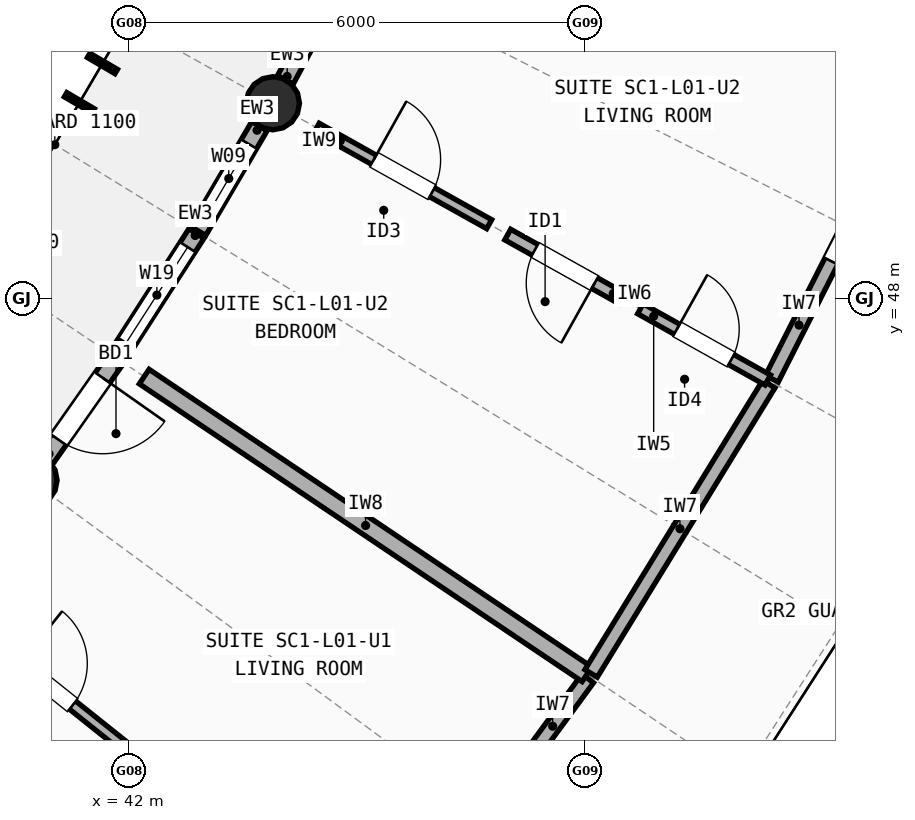
"""IFC4 building model, lengths in metres.
Left out: names, types, materials, properties, quantities, classifications, styles, units other than length and angle.
Written with IfcOpenShell. Run it as: python <this file> out.ifc"""

import sys

from ifc_helpers import new_model, si_unit, direction, frame, frame_2d, origin, origin_2d, place, context, subcontext, project, spatial, rectangle, circle, extrude, element, fill, save


model = new_model("IFC4")
c1 = context("Model", 3, precision=1e-05, world=origin(), true_north=direction((0.0, 1.0)))
c2 = subcontext(c1, "Body", "Model", "MODEL_VIEW")
j1 = project(units=[si_unit("LENGTHUNIT", "METRE"), si_unit("PLANEANGLEUNIT", "RADIAN")], contexts=[c1])
p1 = place(None, origin())
s1 = spatial("IfcSite", under=j1, at=p1, CompositionType="ELEMENT")
p2 = place(p1, origin())
s2 = spatial("IfcBuilding", under=s1, at=p2, CompositionType="ELEMENT")
p3 = place(p2, frame((0.0, 0.0, 4.5)))
s3 = spatial("IfcBuildingStorey", under=s2, at=p3, CompositionType="ELEMENT", Elevation=4.5)
for number, where, z_axis, x_axis in (
    (1, (40.704, 45.61, 0.0), (0.0, 0.0, 1.0), (1.0, 0.0, 0.0)),
    (2, (43.893, 50.57, 0.0), (0.0, 0.0, 1.0), (1.0, 0.0, 0.0)),
):
    element("IfcColumn", number, at=place(p3, frame(where, z_axis=z_axis, x_axis=x_axis)), inside=s3, PredefinedType="COLUMN", context=c2, shape_type="SweptSolid", body=[
        extrude(circle(Radius=0.35, at=origin_2d()), origin(), (0.0, 0.0, 1.0), 2.948),
    ])
p4 = place(p3, frame((40.905, 45.896, 0.0), z_axis=(0.0, 0.0, 1.0), x_axis=(0.574754617893, 0.818325808716, 0.0)))
e3 = element("IfcWall", 3, at=p4, inside=s3, PredefinedType="STANDARD", context=c2, shape_type="SweptSolid", body=[
    extrude(rectangle(XDim=1.597, YDim=0.235, at=frame_2d((0.798, 0.0))), origin(), (0.0, 0.0, 1.0), 2.684),
])
p5 = place(p4, frame((0.298, 0.0, 0.0)))
e4 = element("IfcOpeningElement", 4, at=p5, cuts=e3, PredefinedType="OPENING", context=c2, shape_type="SweptSolid", body=[
    extrude(rectangle(XDim=1.0, YDim=2.15, at=frame_2d((0.5, 1.075))), frame((0.0, 0.127, 0.0), z_axis=(0.0, -1.0, 0.0), x_axis=(1.0, 0.0, 0.0)), (0.0, 0.0, 1.0), 0.255),
])
p6 = place(p3, frame((41.845, 47.236, 0.0), z_axis=(0.0, 0.0, 1.0), x_axis=(0.540911277163, 0.841079657486, 0.0)))
e5 = element("IfcWall", 5, at=p6, inside=s3, PredefinedType="STANDARD", context=c2, shape_type="SweptSolid", body=[
    extrude(rectangle(XDim=1.927, YDim=0.235, at=frame_2d((0.963, 0.0))), origin(), (0.0, 0.0, 1.0), 2.684),
])
p7 = place(p6, frame((0.213, 0.0, 0.85)))
e6 = element("IfcOpeningElement", 6, at=p7, cuts=e5, PredefinedType="OPENING", context=c2, shape_type="SweptSolid", body=[
    extrude(rectangle(XDim=1.5, YDim=1.5, at=frame_2d((0.75, 0.75))), frame((0.0, 0.127, 0.0), z_axis=(0.0, -1.0, 0.0), x_axis=(1.0, 0.0, 0.0)), (0.0, 0.0, 1.0), 0.255),
])
p8 = place(p3, frame((42.908, 48.891, 0.0), z_axis=(0.0, 0.0, 1.0), x_axis=(0.505970625323, 0.862550709414, 0.0)))
e7 = element("IfcWall", 7, at=p8, inside=s3, PredefinedType="STANDARD", context=c2, shape_type="SweptSolid", body=[
    extrude(rectangle(XDim=1.597, YDim=0.235, at=frame_2d((0.798, 0.0))), origin(), (0.0, 0.0, 1.0), 2.684),
])
p9 = place(p8, frame((0.273, 0.0, 0.85)))
e8 = element("IfcOpeningElement", 8, at=p9, cuts=e7, PredefinedType="OPENING", context=c2, shape_type="SweptSolid", body=[
    extrude(rectangle(XDim=1.05, YDim=1.35, at=frame_2d((0.525, 0.675))), frame((0.0, 0.127, 0.0), z_axis=(0.0, -1.0, 0.0), x_axis=(1.0, 0.0, 0.0)), (0.0, 0.0, 1.0), 0.255),
])
p10 = place(p3, frame((44.058, 50.879, 0.0), z_axis=(0.0, 0.0, 1.0), x_axis=(0.470183436771, 0.882568714484, 0.0)))
e9 = element("IfcWall", 9, at=p10, inside=s3, PredefinedType="STANDARD", context=c2, shape_type="SweptSolid", body=[
    extrude(rectangle(XDim=1.597, YDim=0.235, at=frame_2d((0.798, 0.0))), origin(), (0.0, 0.0, 1.0), 2.684),
])
p11 = place(p10, frame((0.248, 0.0, 0.85)))
e10 = element("IfcOpeningElement", 10, at=p11, cuts=e9, PredefinedType="OPENING", context=c2, shape_type="SweptSolid", body=[
    extrude(rectangle(XDim=1.1, YDim=1.45, at=frame_2d((0.55, 0.725))), frame((0.0, 0.127, 0.0), z_axis=(0.0, -1.0, 0.0), x_axis=(1.0, 0.0, 0.0)), (0.0, 0.0, 1.0), 0.255),
])
p12 = place(p3, frame((45.393, 39.4, 0.0), z_axis=(0.0, 0.0, 1.0), x_axis=(0.591475021239, 0.806323321783, 0.0)))
e11 = element("IfcWall", 11, at=p12, inside=s3, PredefinedType="SOLIDWALL", context=c2, shape_type="SweptSolid", body=[
    extrude(rectangle(XDim=4.467, YDim=0.19, at=frame_2d((2.233, 0.0))), origin(), (0.0, 0.0, 1.0), 2.722),
])
p13 = place(p12, frame((1.708, 0.0, 0.0)))
e12 = element("IfcOpeningElement", 12, at=p13, cuts=e11, PredefinedType="OPENING", context=c2, shape_type="SweptSolid", body=[
    extrude(rectangle(XDim=1.05, YDim=2.15, at=frame_2d((0.525, 1.075))), frame((0.0, 0.105, 0.0), z_axis=(0.0, -1.0, 0.0), x_axis=(1.0, 0.0, 0.0)), (0.0, 0.0, 1.0), 0.21),
])
p14 = place(p3, frame((39.774, 43.836, 0.0), z_axis=(0.0, 0.0, 1.0), x_axis=(0.781431339385, -0.623991235377, 0.0)))
e13 = element("IfcWall", 13, at=p14, inside=s3, PredefinedType="PARTITIONING", context=c2, shape_type="SweptSolid", body=[
    extrude(rectangle(XDim=2.92, YDim=0.135, at=frame_2d((1.46, 0.0))), origin(), (0.0, 0.0, 1.0), 2.762),
])
p15 = place(p14, frame((1.02, 0.0, 0.0)))
e14 = element("IfcOpeningElement", 14, at=p15, cuts=e13, PredefinedType="OPENING", context=c2, shape_type="SweptSolid", body=[
    extrude(rectangle(XDim=0.88, YDim=2.1, at=frame_2d((0.44, 1.05))), frame((0.0, 0.077, 0.0), z_axis=(0.0, -1.0, 0.0), x_axis=(1.0, 0.0, 0.0)), (0.0, 0.0, 1.0), 0.155),
])
p16 = place(p3, frame((42.2, 46.974, 0.0), z_axis=(0.0, 0.0, 1.0), x_axis=(0.82987699708, -0.55794638606, 0.0)))
e15 = element("IfcWall", 15, at=p16, inside=s3, PredefinedType="SOLIDWALL", context=c2, shape_type="SweptSolid", body=[
    extrude(rectangle(XDim=7.02, YDim=0.23, at=frame_2d((3.51, 0.0))), origin(), (0.0, 0.0, 1.0), 2.742),
])
p17 = place(p3, frame((48.08, 43.069, 0.0), z_axis=(0.0, 0.0, 1.0), x_axis=(0.523444746739, 0.852059620632, 0.0)))
e16 = element("IfcWall", 16, at=p17, inside=s3, PredefinedType="SOLIDWALL", context=c2, shape_type="SweptSolid", body=[
    extrude(rectangle(XDim=4.467, YDim=0.19, at=frame_2d((2.234, 0.0))), origin(), (0.0, 0.0, 1.0), 2.762),
])
p18 = place(p3, frame((50.457, 46.945, 0.0), z_axis=(0.0, 0.0, 1.0), x_axis=(0.451972910967, 0.892031662976, 0.0)))
e17 = element("IfcWall", 17, at=p18, inside=s3, PredefinedType="SOLIDWALL", context=c2, shape_type="SweptSolid", body=[
    extrude(rectangle(XDim=4.467, YDim=0.19, at=frame_2d((2.234, 0.0))), origin(), (0.0, 0.0, 1.0), 2.742),
])
p19 = place(p18, frame((1.734, 0.0, 0.0)))
e18 = element("IfcOpeningElement", 18, at=p19, cuts=e17, PredefinedType="OPENING", context=c2, shape_type="SweptSolid", body=[
    extrude(rectangle(XDim=1.0, YDim=2.15, at=frame_2d((0.5, 1.075))), frame((0.0, 0.105, 0.0), z_axis=(0.0, -1.0, 0.0), x_axis=(1.0, 0.0, 0.0)), (0.0, 0.0, 1.0), 0.21),
])
p20 = place(p3, frame((44.469, 50.248, 0.0), z_axis=(0.0, 0.0, 1.0), x_axis=(0.872794081277, -0.488088610487, 0.0)))
e19 = element("IfcWall", 19, at=p20, inside=s3, PredefinedType="PARTITIONING", context=c2, shape_type="SweptSolid", body=[
    extrude(rectangle(XDim=2.6, YDim=0.135, at=frame_2d((1.3, 0.0))), origin(), (0.0, 0.0, 1.0), 2.722),
])
p21 = place(p20, frame((0.86, 0.0, 0.0)))
e20 = element("IfcOpeningElement", 20, at=p21, cuts=e19, PredefinedType="OPENING", context=c2, shape_type="SweptSolid", body=[
    extrude(rectangle(XDim=0.88, YDim=2.1, at=frame_2d((0.44, 1.05))), frame((0.0, 0.077, 0.0), z_axis=(0.0, -1.0, 0.0), x_axis=(1.0, 0.0, 0.0)), (0.0, 0.0, 1.0), 0.155),
])
p22 = place(p3, frame((46.983, 48.842, 0.0), z_axis=(0.0, 0.0, 1.0), x_axis=(0.872774545553, -0.48812354239, 0.0)))
e21 = element("IfcWall", 21, at=p22, inside=s3, PredefinedType="PLUMBINGWALL", context=c2, shape_type="SweptSolid", body=[
    extrude(rectangle(XDim=1.72, YDim=0.16, at=frame_2d((0.86, 0.0))), origin(), (0.0, 0.0, 1.0), 2.722),
])
p23 = place(p22, frame((0.41, 0.0, 0.0)))
e22 = element("IfcOpeningElement", 22, at=p23, cuts=e21, PredefinedType="OPENING", context=c2, shape_type="SweptSolid", body=[
    extrude(rectangle(XDim=0.9, YDim=2.1, at=frame_2d((0.45, 1.05))), frame((0.0, 0.09, 0.0), z_axis=(0.0, -1.0, 0.0), x_axis=(1.0, 0.0, 0.0)), (0.0, 0.0, 1.0), 0.18),
])
p24 = place(p3, frame((48.728, 47.866, 0.0), z_axis=(0.0, 0.0, 1.0), x_axis=(0.8728224149, -0.488037941198, 0.0)))
e23 = element("IfcWall", 23, at=p24, inside=s3, PredefinedType="PARTITIONING", context=c2, shape_type="SweptSolid", body=[
    extrude(rectangle(XDim=1.92, YDim=0.15, at=frame_2d((0.96, 0.0))), origin(), (0.0, 0.0, 1.0), 2.722),
])
p25 = place(p24, frame((0.55, 0.0, 0.0)))
e24 = element("IfcOpeningElement", 24, at=p25, cuts=e23, PredefinedType="OPENING", context=c2, shape_type="SweptSolid", body=[
    extrude(rectangle(XDim=0.82, YDim=2.08, at=frame_2d((0.41, 1.04))), frame((0.0, 0.085, 0.0), z_axis=(0.0, -1.0, 0.0), x_axis=(1.0, 0.0, 0.0)), (0.0, 0.0, 1.0), 0.17),
])
p26 = place(p3, frame((46.071, 53.896, 0.0), z_axis=(0.0, 0.0, 1.0), x_axis=(0.909807068599, -0.415031442095, 0.0)))
e25 = element("IfcWall", 25, at=p26, inside=s3, PredefinedType="SOLIDWALL", context=c2, shape_type="SweptSolid", body=[
    extrude(rectangle(XDim=7.02, YDim=0.23, at=frame_2d((3.51, 0.0))), origin(), (0.0, 0.0, 1.0), 2.762),
])
p27 = place(p5, origin())
e26 = element("IfcDoor", 26, at=p27, inside=s3, OperationType="SINGLE_SWING_RIGHT", PredefinedType="DOOR", context=c2, shape_type="SweptSolid", body=[
    extrude(rectangle(XDim=1.0, YDim=2.15, at=frame_2d((0.5, 1.075))), frame((0.0, 0.025, 0.0), z_axis=(0.0, -1.0, 0.0), x_axis=(1.0, 0.0, 0.0)), (0.0, 0.0, 1.0), 0.05),
])
fill(e4, e26)
p28 = place(p7, origin())
e27 = element("IfcWindow", 27, at=p28, inside=s3, PartitioningType="SINGLE_PANEL", PredefinedType="WINDOW", context=c2, shape_type="SweptSolid", body=[
    extrude(rectangle(XDim=1.5, YDim=1.5, at=frame_2d((0.75, 0.75))), frame((0.0, 0.03, 0.0), z_axis=(0.0, -1.0, 0.0), x_axis=(1.0, 0.0, 0.0)), (0.0, 0.0, 1.0), 0.06),
])
fill(e6, e27)
p29 = place(p9, origin())
e28 = element("IfcWindow", 28, at=p29, inside=s3, PartitioningType="SINGLE_PANEL", PredefinedType="WINDOW", context=c2, shape_type="SweptSolid", body=[
    extrude(rectangle(XDim=1.05, YDim=1.35, at=frame_2d((0.525, 0.675))), frame((0.0, 0.03, 0.0), z_axis=(0.0, -1.0, 0.0), x_axis=(1.0, 0.0, 0.0)), (0.0, 0.0, 1.0), 0.06),
])
fill(e8, e28)
p30 = place(p11, origin())
e29 = element("IfcWindow", 29, at=p30, inside=s3, PartitioningType="SINGLE_PANEL", PredefinedType="WINDOW", context=c2, shape_type="SweptSolid", body=[
    extrude(rectangle(XDim=1.1, YDim=1.45, at=frame_2d((0.55, 0.725))), frame((0.0, 0.03, 0.0), z_axis=(0.0, -1.0, 0.0), x_axis=(1.0, 0.0, 0.0)), (0.0, 0.0, 1.0), 0.06),
])
fill(e10, e29)
p31 = place(p15, origin())
e30 = element("IfcDoor", 30, at=p31, inside=s3, OperationType="SINGLE_SWING_LEFT", PredefinedType="DOOR", context=c2, shape_type="SweptSolid", body=[
    extrude(rectangle(XDim=0.88, YDim=2.1, at=frame_2d((0.44, 1.05))), frame((0.0, 0.025, 0.0), z_axis=(0.0, -1.0, 0.0), x_axis=(1.0, 0.0, 0.0)), (0.0, 0.0, 1.0), 0.05),
])
fill(e14, e30)
p32 = place(p19, origin())
e31 = element("IfcDoor", 31, at=p32, inside=s3, OperationType="SINGLE_SWING_RIGHT", PredefinedType="DOOR", context=c2, shape_type="SweptSolid", body=[
    extrude(rectangle(XDim=1.0, YDim=2.15, at=frame_2d((0.5, 1.075))), frame((0.0, 0.025, 0.0), z_axis=(0.0, -1.0, 0.0), x_axis=(1.0, 0.0, 0.0)), (0.0, 0.0, 1.0), 0.05),
])
fill(e18, e31)
p33 = place(p21, origin())
e32 = element("IfcDoor", 32, at=p33, inside=s3, OperationType="SINGLE_SWING_LEFT", PredefinedType="DOOR", context=c2, shape_type="SweptSolid", body=[
    extrude(rectangle(XDim=0.88, YDim=2.1, at=frame_2d((0.44, 1.05))), frame((0.0, 0.025, 0.0), z_axis=(0.0, -1.0, 0.0), x_axis=(1.0, 0.0, 0.0)), (0.0, 0.0, 1.0), 0.05),
])
fill(e20, e32)
p34 = place(p23, origin())
e33 = element("IfcDoor", 33, at=p34, inside=s3, OperationType="SINGLE_SWING_RIGHT", PredefinedType="DOOR", context=c2, shape_type="SweptSolid", body=[
    extrude(rectangle(XDim=0.9, YDim=2.1, at=frame_2d((0.45, 1.05))), frame((0.0, 0.025, 0.0), z_axis=(0.0, -1.0, 0.0), x_axis=(1.0, 0.0, 0.0)), (0.0, 0.0, 1.0), 0.05),
])
fill(e22, e33)
p35 = place(p25, origin())
e34 = element("IfcDoor", 34, at=p35, inside=s3, OperationType="SINGLE_SWING_LEFT", PredefinedType="DOOR", context=c2, shape_type="SweptSolid", body=[
    extrude(rectangle(XDim=0.82, YDim=2.08, at=frame_2d((0.41, 1.04))), frame((0.0, 0.025, 0.0), z_axis=(0.0, -1.0, 0.0), x_axis=(1.0, 0.0, 0.0)), (0.0, 0.0, 1.0), 0.05),
])
fill(e24, e34)
save(model, sys.argv[1])
